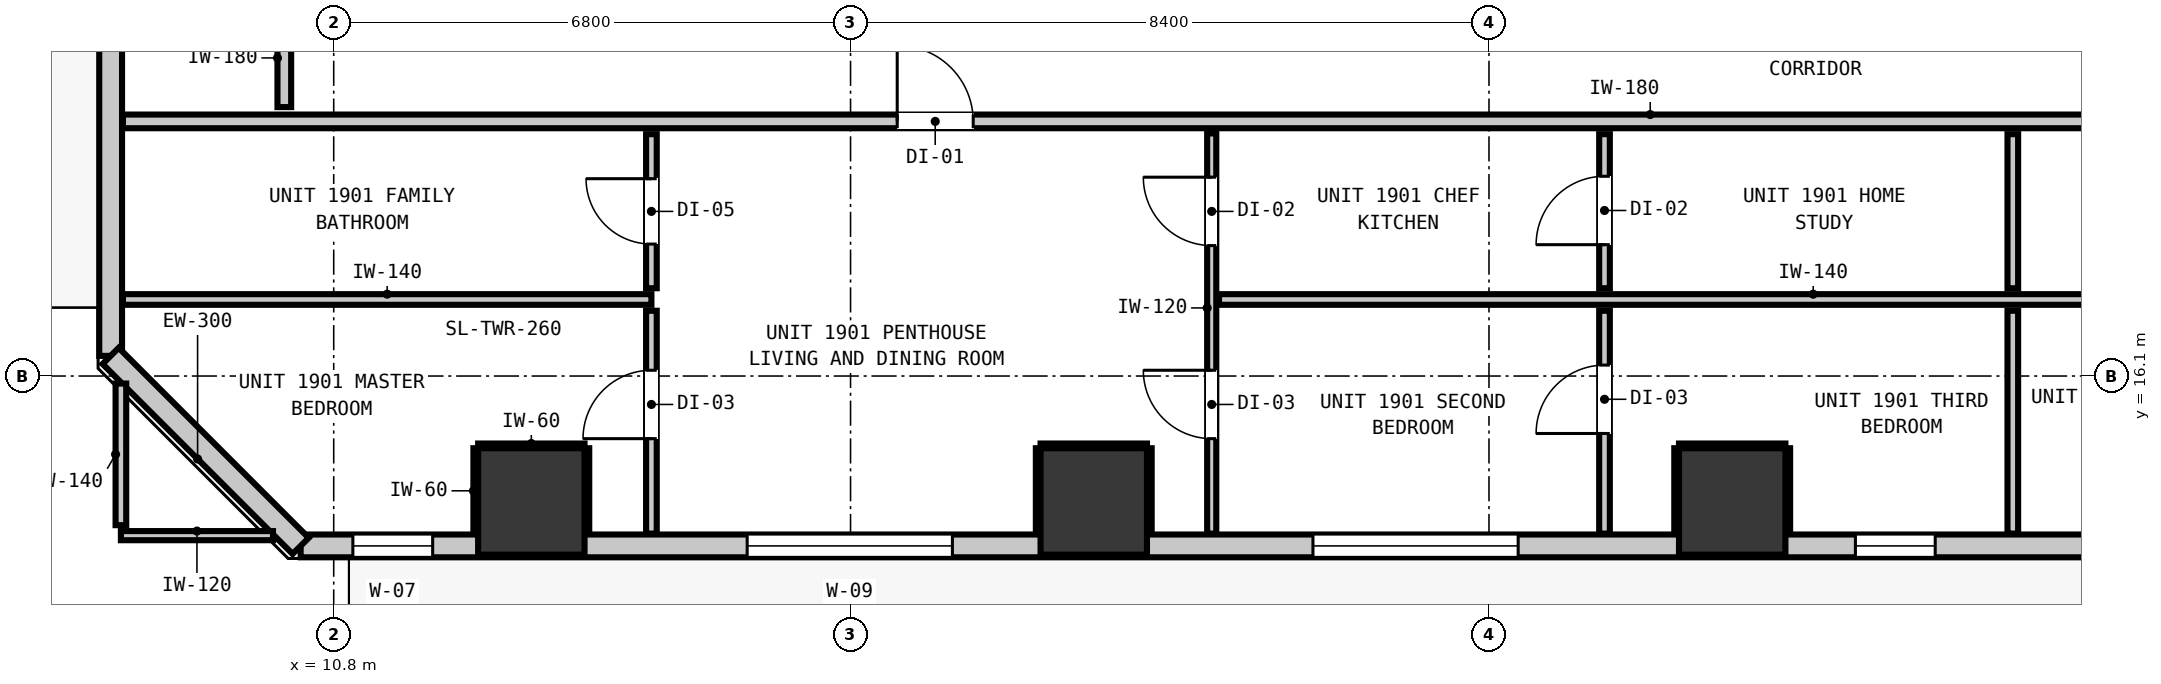
"""IFC4 building model, lengths in metres.
Left out: names, types, materials, properties, quantities, classifications, styles, units other than length and angle.
Written with IfcOpenShell. Run it as: python <this file> out.ifc"""

import sys

from ifc_helpers import new_model, si_unit, direction, frame, frame_2d, origin, origin_2d, place, context, subcontext, project, spatial, rectangle, extrude, element, fill, save


model = new_model("IFC4")
c1 = context("Model", 3, precision=1e-05, world=origin(), true_north=direction((0.0, 1.0)))
c2 = subcontext(c1, "Body", "Model", "MODEL_VIEW")
j1 = project(units=[si_unit("LENGTHUNIT", "METRE"), si_unit("PLANEANGLEUNIT", "RADIAN")], contexts=[c1])
p1 = place(None, origin())
s1 = spatial("IfcSite", under=j1, at=p1, CompositionType="ELEMENT")
p2 = place(p1, origin())
s2 = spatial("IfcBuilding", under=s1, at=p2, CompositionType="ELEMENT")
p3 = place(p2, frame((0.0, 0.0, 68.48)))
s3 = spatial("IfcBuildingStorey", under=s2, at=p3, CompositionType="ELEMENT", Elevation=68.48)
for number, where, z_axis, x_axis in (
    (1, (13.4, 14.45, 0.0), (0.0, 0.0, 1.0), (1.0, 0.0, 0.0)),
    (2, (20.8, 14.45, 0.0), (0.0, 0.0, 1.0), (1.0, 0.0, 0.0)),
    (3, (29.2, 14.45, 0.0), (0.0, 0.0, 1.0), (1.0, 0.0, 0.0)),
):
    element("IfcColumn", number, at=place(p3, frame(where, z_axis=z_axis, x_axis=x_axis)), inside=s3, PredefinedType="COLUMN", context=c2, shape_type="SweptSolid", body=[
        extrude(rectangle(XDim=1.4, YDim=1.4, at=origin_2d()), origin(), (0.0, 0.0, 1.0), 3.32),
    ])
p4 = place(p3, frame((7.865, 16.365, 0.0), z_axis=(0.0, 0.0, 1.0), x_axis=(0.0, 1.0, 0.0)))
e4 = element("IfcWall", 4, at=p4, inside=s3, PredefinedType="STANDARD", context=c2, shape_type="SweptSolid", body=[
    extrude(rectangle(XDim=34.67, YDim=0.3, at=frame_2d((17.335, 0.0))), origin(), (0.0, 0.0, 1.0), 3.06),
])
p5 = place(p4, frame((32.419, 0.0, 0.0)))
e5 = element("IfcOpeningElement", 5, at=p5, cuts=e4, PredefinedType="OPENING", context=c2, shape_type="SweptSolid", body=[
    extrude(rectangle(XDim=1.0, YDim=2.15, at=frame_2d((0.5, 1.075))), frame((0.0, 0.16, 0.0), z_axis=(0.0, -1.0, 0.0), x_axis=(1.0, 0.0, 0.0)), (0.0, 0.0, 1.0), 0.32),
])
p6 = place(p4, frame((33.809, 0.0, 0.85)))
e6 = element("IfcOpeningElement", 6, at=p6, cuts=e4, PredefinedType="OPENING", context=c2, shape_type="SweptSolid", body=[
    extrude(rectangle(XDim=0.58, YDim=1.5, at=frame_2d((0.29, 0.75))), frame((0.0, 0.16, 0.0), z_axis=(0.0, -1.0, 0.0), x_axis=(1.0, 0.0, 0.0)), (0.0, 0.0, 1.0), 0.32),
])
p7 = place(p3, frame((47.835, 13.865, 0.0), z_axis=(0.0, 0.0, 1.0), x_axis=(-1.0, 0.0, 0.0)))
e7 = element("IfcWall", 7, at=p7, inside=s3, PredefinedType="STANDARD", context=c2, shape_type="SweptSolid", body=[
    extrude(rectangle(XDim=37.47, YDim=0.3, at=frame_2d((18.735, 0.0))), origin(), (0.0, 0.0, 1.0), 3.06),
])
p8 = place(p7, frame((0.901, 0.0, 0.0)))
e8 = element("IfcOpeningElement", 8, at=p8, cuts=e7, PredefinedType="OPENING", context=c2, shape_type="SweptSolid", body=[
    extrude(rectangle(XDim=1.0, YDim=2.15, at=frame_2d((0.5, 1.075))), frame((0.0, 0.16, 0.0), z_axis=(0.0, -1.0, 0.0), x_axis=(1.0, 0.0, 0.0)), (0.0, 0.0, 1.0), 0.32),
])
p9 = place(p7, frame((28.895, 0.0, 0.85)))
e9 = element("IfcOpeningElement", 9, at=p9, cuts=e7, PredefinedType="OPENING", context=c2, shape_type="SweptSolid", body=[
    extrude(rectangle(XDim=2.7, YDim=2.0, at=frame_2d((1.35, 1.0))), frame((0.0, 0.16, 0.0), z_axis=(0.0, -1.0, 0.0), x_axis=(1.0, 0.0, 0.0)), (0.0, 0.0, 1.0), 0.32),
])
p10 = place(p7, frame((35.733, 0.0, 0.85)))
e10 = element("IfcOpeningElement", 10, at=p10, cuts=e7, PredefinedType="OPENING", context=c2, shape_type="SweptSolid", body=[
    extrude(rectangle(XDim=1.05, YDim=1.65, at=frame_2d((0.525, 0.825))), frame((0.0, 0.16, 0.0), z_axis=(0.0, -1.0, 0.0), x_axis=(1.0, 0.0, 0.0)), (0.0, 0.0, 1.0), 0.32),
])
p11 = place(p7, frame((21.451, 0.0, 0.85)))
e11 = element("IfcOpeningElement", 11, at=p11, cuts=e7, PredefinedType="OPENING", context=c2, shape_type="SweptSolid", body=[
    extrude(rectangle(XDim=2.7, YDim=2.0, at=frame_2d((1.35, 1.0))), frame((0.0, 0.16, 0.0), z_axis=(0.0, -1.0, 0.0), x_axis=(1.0, 0.0, 0.0)), (0.0, 0.0, 1.0), 0.32),
])
p12 = place(p7, frame((15.964, 0.0, 0.85)))
e12 = element("IfcOpeningElement", 12, at=p12, cuts=e7, PredefinedType="OPENING", context=c2, shape_type="SweptSolid", body=[
    extrude(rectangle(XDim=1.05, YDim=1.65, at=frame_2d((0.525, 0.825))), frame((0.0, 0.16, 0.0), z_axis=(0.0, -1.0, 0.0), x_axis=(1.0, 0.0, 0.0)), (0.0, 0.0, 1.0), 0.32),
])
p13 = place(p7, frame((5.025, 0.0, 0.85)))
e13 = element("IfcOpeningElement", 13, at=p13, cuts=e7, PredefinedType="OPENING", context=c2, shape_type="SweptSolid", body=[
    extrude(rectangle(XDim=2.7, YDim=2.0, at=frame_2d((1.35, 1.0))), frame((0.0, 0.16, 0.0), z_axis=(0.0, -1.0, 0.0), x_axis=(1.0, 0.0, 0.0)), (0.0, 0.0, 1.0), 0.32),
])
p14 = place(p7, frame((12.914, 0.0, 0.85)))
e14 = element("IfcOpeningElement", 14, at=p14, cuts=e7, PredefinedType="OPENING", context=c2, shape_type="SweptSolid", body=[
    extrude(rectangle(XDim=1.05, YDim=1.65, at=frame_2d((0.525, 0.825))), frame((0.0, 0.16, 0.0), z_axis=(0.0, -1.0, 0.0), x_axis=(1.0, 0.0, 0.0)), (0.0, 0.0, 1.0), 0.32),
])
p15 = place(p3, frame((10.365, 13.865, 0.0), z_axis=(0.0, 0.0, 1.0), x_axis=(-0.707106781187, 0.707106781187, 0.0)))
e15 = element("IfcWall", 15, at=p15, inside=s3, PredefinedType="STANDARD", context=c2, shape_type="SweptSolid", body=[
    extrude(rectangle(XDim=3.536, YDim=0.3, at=frame_2d((1.768, 0.0))), origin(), (0.0, 0.0, 1.0), 3.06),
])
p16 = place(p3, frame((8.027, 19.45, 0.0), z_axis=(0.0, 0.0, 1.0), x_axis=(1.0, 0.0, 0.0)))
e16 = element("IfcWall", 16, at=p16, inside=s3, PredefinedType="PARTITIONING", context=c2, shape_type="SweptSolid", body=[
    extrude(rectangle(XDim=28.902, YDim=0.18, at=frame_2d((14.451, 0.0))), origin(), (0.0, 0.0, 1.0), 3.06),
])
p17 = place(p16, frame((10.187, 0.0, 0.0)))
e17 = element("IfcOpeningElement", 17, at=p17, cuts=e16, PredefinedType="OPENING", context=c2, shape_type="SweptSolid", body=[
    extrude(rectangle(XDim=1.0, YDim=2.15, at=frame_2d((0.5, 1.075))), frame((0.0, 0.1, 0.0), z_axis=(0.0, -1.0, 0.0), x_axis=(1.0, 0.0, 0.0)), (0.0, 0.0, 1.0), 0.2),
])
p18 = place(p3, frame((8.027, 17.107, 0.0), z_axis=(0.0, 0.0, 1.0), x_axis=(1.0, 0.0, 0.0)))
e18 = element("IfcWall", 18, at=p18, inside=s3, PredefinedType="PARTITIONING", context=c2, shape_type="SweptSolid", body=[
    extrude(rectangle(XDim=6.953, YDim=0.14, at=frame_2d((3.477, 0.0))), origin(), (0.0, 0.0, 1.0), 3.06),
])
p19 = place(p3, frame((22.448, 17.107, 0.0), z_axis=(0.0, 0.0, 1.0), x_axis=(1.0, 0.0, 0.0)))
e19 = element("IfcWall", 19, at=p19, inside=s3, PredefinedType="PARTITIONING", context=c2, shape_type="SweptSolid", body=[
    extrude(rectangle(XDim=15.636, YDim=0.14, at=frame_2d((7.818, 0.0))), origin(), (0.0, 0.0, 1.0), 3.06),
])
p20 = place(p3, frame((8.0, 14.0, 0.0), z_axis=(0.0, 0.0, 1.0), x_axis=(1.0, 0.0, 0.0)))
e20 = element("IfcWall", 20, at=p20, inside=s3, PredefinedType="PARTITIONING", context=c2, shape_type="SweptSolid", body=[
    extrude(rectangle(XDim=2.001, YDim=0.12, at=frame_2d((1.0, 0.0))), origin(), (0.0, 0.0, 1.0), 3.06),
])
p21 = place(p3, frame((10.15, 19.638, 0.0), z_axis=(0.0, 0.0, 1.0), x_axis=(0.0, 1.0, 0.0)))
e21 = element("IfcWall", 21, at=p21, inside=s3, PredefinedType="PARTITIONING", context=c2, shape_type="SweptSolid", body=[
    extrude(rectangle(XDim=1.294, YDim=0.18, at=frame_2d((0.647, 0.0))), origin(), (0.0, 0.0, 1.0), 2.445),
])
p22 = place(p3, frame((8.0, 14.138, 0.0), z_axis=(0.0, 0.0, 1.0), x_axis=(0.0, 1.0, 0.0)))
e22 = element("IfcWall", 22, at=p22, inside=s3, PredefinedType="PARTITIONING", context=c2, shape_type="SweptSolid", body=[
    extrude(rectangle(XDim=1.863, YDim=0.14, at=frame_2d((0.932, 0.0))), origin(), (0.0, 0.0, 1.0), 3.06),
])
p23 = place(p3, frame((14.98, 14.027, 0.0), z_axis=(0.0, 0.0, 1.0), x_axis=(0.0, 1.0, 0.0)))
e23 = element("IfcWall", 23, at=p23, inside=s3, PredefinedType="PARTITIONING", context=c2, shape_type="SweptSolid", body=[
    extrude(rectangle(XDim=2.932, YDim=0.14, at=frame_2d((1.466, 0.0))), origin(), (0.0, 0.0, 1.0), 3.06),
])
p24 = place(p23, frame((1.249, 0.0, 0.0)))
e24 = element("IfcOpeningElement", 24, at=p24, cuts=e23, PredefinedType="OPENING", context=c2, shape_type="SweptSolid", body=[
    extrude(rectangle(XDim=0.9, YDim=2.1, at=frame_2d((0.45, 1.05))), frame((0.0, 0.08, 0.0), z_axis=(0.0, -1.0, 0.0), x_axis=(1.0, 0.0, 0.0)), (0.0, 0.0, 1.0), 0.16),
])
p25 = place(p3, frame((14.98, 17.255, 0.0), z_axis=(0.0, 0.0, 1.0), x_axis=(0.0, 1.0, 0.0)))
e25 = element("IfcWall", 25, at=p25, inside=s3, PredefinedType="PARTITIONING", context=c2, shape_type="SweptSolid", body=[
    extrude(rectangle(XDim=2.027, YDim=0.14, at=frame_2d((1.014, 0.0))), origin(), (0.0, 0.0, 1.0), 3.06),
])
p26 = place(p25, frame((0.581, 0.0, 0.0)))
e26 = element("IfcOpeningElement", 26, at=p26, cuts=e25, PredefinedType="OPENING", context=c2, shape_type="SweptSolid", body=[
    extrude(rectangle(XDim=0.86, YDim=2.02, at=frame_2d((0.43, 1.01))), frame((0.0, 0.08, 0.0), z_axis=(0.0, -1.0, 0.0), x_axis=(1.0, 0.0, 0.0)), (0.0, 0.0, 1.0), 0.16),
])
p27 = place(p3, frame((27.52, 14.027, 0.0), z_axis=(0.0, 0.0, 1.0), x_axis=(0.0, 1.0, 0.0)))
e27 = element("IfcWall", 27, at=p27, inside=s3, PredefinedType="PARTITIONING", context=c2, shape_type="SweptSolid", body=[
    extrude(rectangle(XDim=2.932, YDim=0.14, at=frame_2d((1.466, 0.0))), origin(), (0.0, 0.0, 1.0), 3.06),
])
p28 = place(p27, frame((1.317, 0.0, 0.0)))
e28 = element("IfcOpeningElement", 28, at=p28, cuts=e27, PredefinedType="OPENING", context=c2, shape_type="SweptSolid", body=[
    extrude(rectangle(XDim=0.9, YDim=2.1, at=frame_2d((0.45, 1.05))), frame((0.0, 0.08, 0.0), z_axis=(0.0, -1.0, 0.0), x_axis=(1.0, 0.0, 0.0)), (0.0, 0.0, 1.0), 0.16),
])
p29 = place(p3, frame((27.52, 17.255, 0.0), z_axis=(0.0, 0.0, 1.0), x_axis=(0.0, 1.0, 0.0)))
e29 = element("IfcWall", 29, at=p29, inside=s3, PredefinedType="PARTITIONING", context=c2, shape_type="SweptSolid", body=[
    extrude(rectangle(XDim=2.027, YDim=0.14, at=frame_2d((1.014, 0.0))), origin(), (0.0, 0.0, 1.0), 3.06),
])
p30 = place(p29, frame((0.573, 0.0, 0.0)))
e30 = element("IfcOpeningElement", 30, at=p30, cuts=e29, PredefinedType="OPENING", context=c2, shape_type="SweptSolid", body=[
    extrude(rectangle(XDim=0.9, YDim=2.1, at=frame_2d((0.45, 1.05))), frame((0.0, 0.08, 0.0), z_axis=(0.0, -1.0, 0.0), x_axis=(1.0, 0.0, 0.0)), (0.0, 0.0, 1.0), 0.16),
])
p31 = place(p3, frame((32.892, 14.027, 0.0), z_axis=(0.0, 0.0, 1.0), x_axis=(0.0, 1.0, 0.0)))
e31 = element("IfcWall", 31, at=p31, inside=s3, PredefinedType="PARTITIONING", context=c2, shape_type="SweptSolid", body=[
    extrude(rectangle(XDim=2.932, YDim=0.14, at=frame_2d((1.466, 0.0))), origin(), (0.0, 0.0, 1.0), 3.06),
])
p32 = place(p3, frame((32.892, 17.255, 0.0), z_axis=(0.0, 0.0, 1.0), x_axis=(0.0, 1.0, 0.0)))
e32 = element("IfcWall", 32, at=p32, inside=s3, PredefinedType="PARTITIONING", context=c2, shape_type="SweptSolid", body=[
    extrude(rectangle(XDim=2.027, YDim=0.14, at=frame_2d((1.014, 0.0))), origin(), (0.0, 0.0, 1.0), 3.06),
])
p33 = place(p3, frame((22.352, 14.027, 0.0), z_axis=(0.0, 0.0, 1.0), x_axis=(0.0, 1.0, 0.0)))
e33 = element("IfcWall", 33, at=p33, inside=s3, PredefinedType="PARTITIONING", context=c2, shape_type="SweptSolid", body=[
    extrude(rectangle(XDim=5.265, YDim=0.12, at=frame_2d((2.632, 0.0))), origin(), (0.0, 0.0, 1.0), 3.06),
])
p34 = place(p33, frame((3.789, 0.0, 0.0)))
e34 = element("IfcOpeningElement", 34, at=p34, cuts=e33, PredefinedType="OPENING", context=c2, shape_type="SweptSolid", body=[
    extrude(rectangle(XDim=0.9, YDim=2.1, at=frame_2d((0.45, 1.05))), frame((0.0, 0.07, 0.0), z_axis=(0.0, -1.0, 0.0), x_axis=(1.0, 0.0, 0.0)), (0.0, 0.0, 1.0), 0.14),
])
p35 = place(p33, frame((1.249, 0.0, 0.0)))
e35 = element("IfcOpeningElement", 35, at=p35, cuts=e33, PredefinedType="OPENING", context=c2, shape_type="SweptSolid", body=[
    extrude(rectangle(XDim=0.9, YDim=2.1, at=frame_2d((0.45, 1.05))), frame((0.0, 0.07, 0.0), z_axis=(0.0, -1.0, 0.0), x_axis=(1.0, 0.0, 0.0)), (0.0, 0.0, 1.0), 0.14),
])
p36 = place(p3, frame((12.7, 15.182, 0.0), z_axis=(0.0, 0.0, 1.0), x_axis=(1.0, 0.0, 0.0)))
e36 = element("IfcWall", 36, at=p36, inside=s3, PredefinedType="PARTITIONING", context=c2, shape_type="SweptSolid", body=[
    extrude(rectangle(XDim=1.4, YDim=0.06, at=frame_2d((0.7, 0.0))), origin(), (0.0, 0.0, 1.0), 1.45),
])
for number, where, z_axis, x_axis in (
    (37, (12.668, 14.03, 0.0), (0.0, 0.0, 1.0), (0.0, 1.0, 0.0)),
    (38, (14.132, 14.03, 0.0), (0.0, 0.0, 1.0), (0.0, 1.0, 0.0)),
):
    element("IfcWall", number, at=place(p3, frame(where, z_axis=z_axis, x_axis=x_axis)), inside=s3, PredefinedType="PARTITIONING", context=c2, shape_type="SweptSolid", body=[
        extrude(rectangle(XDim=1.12, YDim=0.06, at=frame_2d((0.56, 0.0))), origin(), (0.0, 0.0, 1.0), 1.45),
    ])
p37 = place(p3, frame((20.1, 15.182, 0.0), z_axis=(0.0, 0.0, 1.0), x_axis=(1.0, 0.0, 0.0)))
e39 = element("IfcWall", 39, at=p37, inside=s3, PredefinedType="PARTITIONING", context=c2, shape_type="SweptSolid", body=[
    extrude(rectangle(XDim=1.4, YDim=0.06, at=frame_2d((0.7, 0.0))), origin(), (0.0, 0.0, 1.0), 1.45),
])
for number, where, z_axis, x_axis in (
    (40, (20.068, 14.03, 0.0), (0.0, 0.0, 1.0), (0.0, 1.0, 0.0)),
    (41, (21.532, 14.03, 0.0), (0.0, 0.0, 1.0), (0.0, 1.0, 0.0)),
):
    element("IfcWall", number, at=place(p3, frame(where, z_axis=z_axis, x_axis=x_axis)), inside=s3, PredefinedType="PARTITIONING", context=c2, shape_type="SweptSolid", body=[
        extrude(rectangle(XDim=1.12, YDim=0.06, at=frame_2d((0.56, 0.0))), origin(), (0.0, 0.0, 1.0), 1.45),
    ])
p38 = place(p3, frame((28.5, 15.182, 0.0), z_axis=(0.0, 0.0, 1.0), x_axis=(1.0, 0.0, 0.0)))
e42 = element("IfcWall", 42, at=p38, inside=s3, PredefinedType="PARTITIONING", context=c2, shape_type="SweptSolid", body=[
    extrude(rectangle(XDim=1.4, YDim=0.06, at=frame_2d((0.7, 0.0))), origin(), (0.0, 0.0, 1.0), 1.45),
])
for number, where, z_axis, x_axis in (
    (43, (28.468, 14.03, 0.0), (0.0, 0.0, 1.0), (0.0, 1.0, 0.0)),
    (44, (29.932, 14.03, 0.0), (0.0, 0.0, 1.0), (0.0, 1.0, 0.0)),
):
    element("IfcWall", number, at=place(p3, frame(where, z_axis=z_axis, x_axis=x_axis)), inside=s3, PredefinedType="PARTITIONING", context=c2, shape_type="SweptSolid", body=[
        extrude(rectangle(XDim=1.12, YDim=0.06, at=frame_2d((0.56, 0.0))), origin(), (0.0, 0.0, 1.0), 1.45),
    ])
p39 = place(p9, origin())
e45 = element("IfcWindow", 45, at=p39, inside=s3, PartitioningType="SINGLE_PANEL", PredefinedType="WINDOW", context=c2, shape_type="SweptSolid", body=[
    extrude(rectangle(XDim=2.7, YDim=2.0, at=frame_2d((1.35, 1.0))), frame((0.0, 0.03, 0.0), z_axis=(0.0, -1.0, 0.0), x_axis=(1.0, 0.0, 0.0)), (0.0, 0.0, 1.0), 0.06),
])
fill(e9, e45)
p40 = place(p10, origin())
e46 = element("IfcWindow", 46, at=p40, inside=s3, PartitioningType="SINGLE_PANEL", PredefinedType="WINDOW", context=c2, shape_type="SweptSolid", body=[
    extrude(rectangle(XDim=1.05, YDim=1.65, at=frame_2d((0.525, 0.825))), frame((0.0, 0.03, 0.0), z_axis=(0.0, -1.0, 0.0), x_axis=(1.0, 0.0, 0.0)), (0.0, 0.0, 1.0), 0.06),
])
fill(e10, e46)
p41 = place(p11, origin())
e47 = element("IfcWindow", 47, at=p41, inside=s3, PartitioningType="SINGLE_PANEL", PredefinedType="WINDOW", context=c2, shape_type="SweptSolid", body=[
    extrude(rectangle(XDim=2.7, YDim=2.0, at=frame_2d((1.35, 1.0))), frame((0.0, 0.03, 0.0), z_axis=(0.0, -1.0, 0.0), x_axis=(1.0, 0.0, 0.0)), (0.0, 0.0, 1.0), 0.06),
])
fill(e11, e47)
p42 = place(p12, origin())
e48 = element("IfcWindow", 48, at=p42, inside=s3, PartitioningType="SINGLE_PANEL", PredefinedType="WINDOW", context=c2, shape_type="SweptSolid", body=[
    extrude(rectangle(XDim=1.05, YDim=1.65, at=frame_2d((0.525, 0.825))), frame((0.0, 0.03, 0.0), z_axis=(0.0, -1.0, 0.0), x_axis=(1.0, 0.0, 0.0)), (0.0, 0.0, 1.0), 0.06),
])
fill(e12, e48)
p43 = place(p17, origin())
e49 = element("IfcDoor", 49, at=p43, inside=s3, OperationType="SINGLE_SWING_LEFT", PredefinedType="DOOR", context=c2, shape_type="SweptSolid", body=[
    extrude(rectangle(XDim=1.0, YDim=2.15, at=frame_2d((0.5, 1.075))), frame((0.0, 0.025, 0.0), z_axis=(0.0, -1.0, 0.0), x_axis=(1.0, 0.0, 0.0)), (0.0, 0.0, 1.0), 0.05),
])
fill(e17, e49)
p44 = place(p26, origin())
e50 = element("IfcDoor", 50, at=p44, inside=s3, OperationType="SINGLE_SWING_RIGHT", PredefinedType="DOOR", context=c2, shape_type="SweptSolid", body=[
    extrude(rectangle(XDim=0.86, YDim=2.02, at=frame_2d((0.43, 1.01))), frame((0.0, 0.025, 0.0), z_axis=(0.0, -1.0, 0.0), x_axis=(1.0, 0.0, 0.0)), (0.0, 0.0, 1.0), 0.05),
])
fill(e26, e50)
p45 = place(p24, origin())
e51 = element("IfcDoor", 51, at=p45, inside=s3, OperationType="SINGLE_SWING_LEFT", PredefinedType="DOOR", context=c2, shape_type="SweptSolid", body=[
    extrude(rectangle(XDim=0.9, YDim=2.1, at=frame_2d((0.45, 1.05))), frame((0.0, 0.025, 0.0), z_axis=(0.0, -1.0, 0.0), x_axis=(1.0, 0.0, 0.0)), (0.0, 0.0, 1.0), 0.05),
])
fill(e24, e51)
p46 = place(p34, origin())
e52 = element("IfcDoor", 52, at=p46, inside=s3, OperationType="SINGLE_SWING_RIGHT", PredefinedType="DOOR", context=c2, shape_type="SweptSolid", body=[
    extrude(rectangle(XDim=0.9, YDim=2.1, at=frame_2d((0.45, 1.05))), frame((0.0, 0.025, 0.0), z_axis=(0.0, -1.0, 0.0), x_axis=(1.0, 0.0, 0.0)), (0.0, 0.0, 1.0), 0.05),
])
fill(e34, e52)
p47 = place(p30, origin())
e53 = element("IfcDoor", 53, at=p47, inside=s3, OperationType="SINGLE_SWING_LEFT", PredefinedType="DOOR", context=c2, shape_type="SweptSolid", body=[
    extrude(rectangle(XDim=0.9, YDim=2.1, at=frame_2d((0.45, 1.05))), frame((0.0, 0.025, 0.0), z_axis=(0.0, -1.0, 0.0), x_axis=(1.0, 0.0, 0.0)), (0.0, 0.0, 1.0), 0.05),
])
fill(e30, e53)
p48 = place(p35, origin())
e54 = element("IfcDoor", 54, at=p48, inside=s3, OperationType="SINGLE_SWING_RIGHT", PredefinedType="DOOR", context=c2, shape_type="SweptSolid", body=[
    extrude(rectangle(XDim=0.9, YDim=2.1, at=frame_2d((0.45, 1.05))), frame((0.0, 0.025, 0.0), z_axis=(0.0, -1.0, 0.0), x_axis=(1.0, 0.0, 0.0)), (0.0, 0.0, 1.0), 0.05),
])
fill(e35, e54)
p49 = place(p28, origin())
e55 = element("IfcDoor", 55, at=p49, inside=s3, OperationType="SINGLE_SWING_LEFT", PredefinedType="DOOR", context=c2, shape_type="SweptSolid", body=[
    extrude(rectangle(XDim=0.9, YDim=2.1, at=frame_2d((0.45, 1.05))), frame((0.0, 0.025, 0.0), z_axis=(0.0, -1.0, 0.0), x_axis=(1.0, 0.0, 0.0)), (0.0, 0.0, 1.0), 0.05),
])
fill(e28, e55)
save(model, sys.argv[1])
